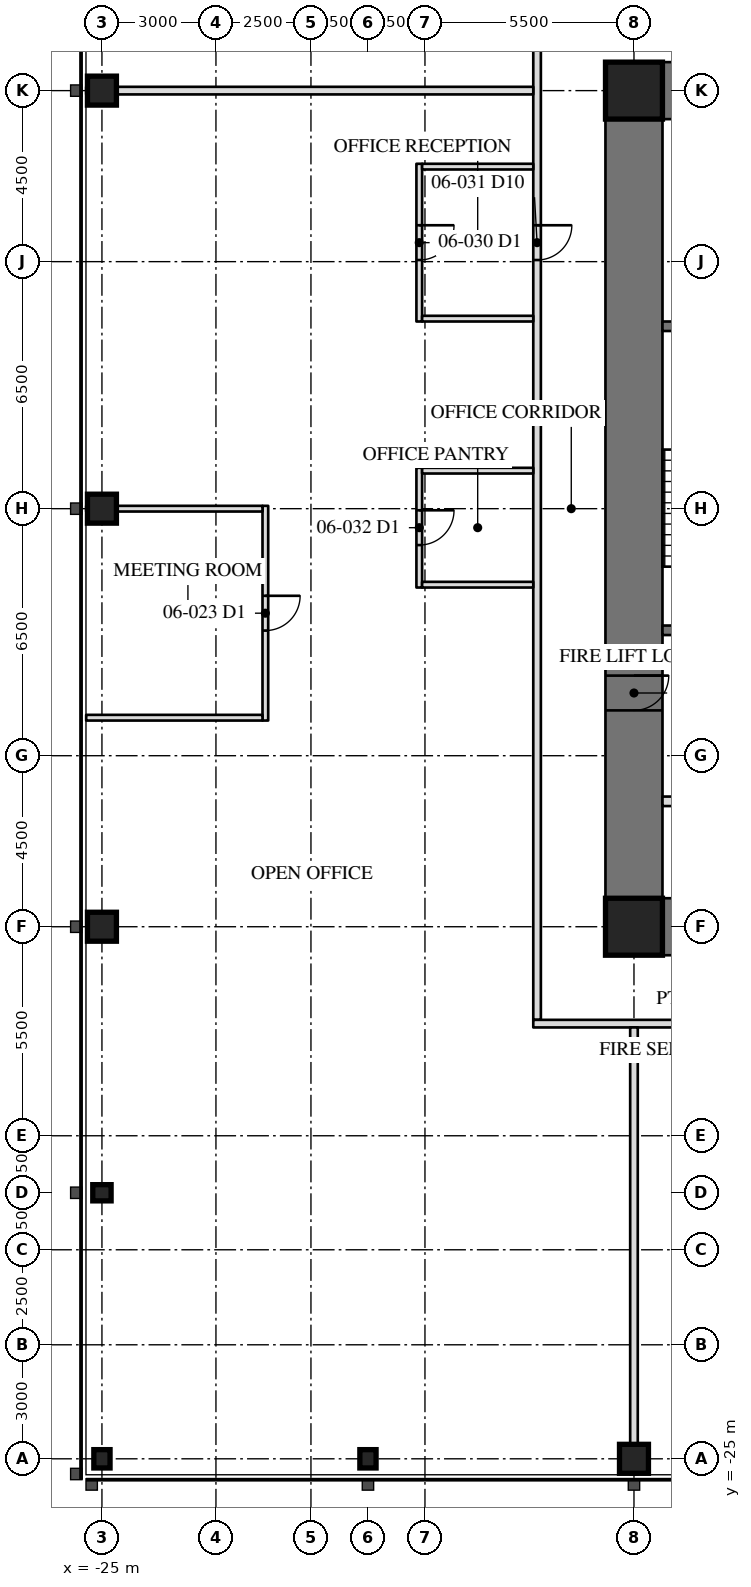
"""IFC4 building model, lengths in metres.
Left out: names, types, materials, properties, quantities, classifications, styles, units other than length and angle.
Written with IfcOpenShell. Run it as: python <this file> out.ifc"""

import sys

from ifc_helpers import new_model, si_unit, direction, frame, frame_2d, origin, origin_2d, place, context, subcontext, project, spatial, rectangle, hollow_rectangle, i_section, extrude, element, fill, save


model = new_model("IFC4")
c1 = context("Model", 3, precision=1e-05, world=origin(), true_north=direction((0.0, 1.0)))
c2 = subcontext(c1, "Body", "Model", "MODEL_VIEW")
j1 = project(units=[si_unit("LENGTHUNIT", "METRE"), si_unit("PLANEANGLEUNIT", "RADIAN")], contexts=[c1])
p1 = place(None, origin())
s1 = spatial("IfcSite", under=j1, at=p1, CompositionType="ELEMENT")
p2 = place(p1, origin())
s2 = spatial("IfcBuilding", under=s1, at=p2, CompositionType="ELEMENT")
p3 = place(p2, frame((0.0, 0.0, 28.3)))
s3 = spatial("IfcBuildingStorey", under=s2, at=p3, CompositionType="ELEMENT", Elevation=28.3)
for number, where, z_axis, x_axis in (
    (1, (-25.0, 0.0, 0.0), (0.0, 0.0, 1.0), (0.0, 1.0, 0.0)),
    (2, (-25.0, -11.0, 0.0), (0.0, 0.0, 1.0), (0.0, 1.0, 0.0)),
):
    element("IfcColumn", number, at=place(p3, frame(where, z_axis=z_axis, x_axis=x_axis)), inside=s3, PredefinedType="COLUMN", context=c2, shape_type="SweptSolid", body=[
        extrude(hollow_rectangle(XDim=0.762, YDim=0.762, WallThickness=0.127, at=origin_2d()), origin(), (0.0, 0.0, 1.0), 4.1),
    ])
for number, where, z_axis, x_axis in (
    (3, (-25.0, -18.0, 0.0), (0.0, 0.0, 1.0), (0.0, 1.0, 0.0)),
    (4, (-25.0, -25.0, 0.0), (0.0, 0.0, 1.0), (1.0, 0.0, 0.0)),
    (5, (-18.0, -25.0, 0.0), (0.0, 0.0, 1.0), (1.0, 0.0, 0.0)),
):
    element("IfcColumn", number, at=place(p3, frame(where, z_axis=z_axis, x_axis=x_axis)), inside=s3, PredefinedType="COLUMN", context=c2, shape_type="SweptSolid", body=[
        extrude(i_section(OverallWidth=0.427, OverallDepth=0.483, WebThickness=0.051, FlangeThickness=0.082, at=origin_2d()), origin(), (0.0, 0.0, 1.0), 4.1),
    ])
for number, where, z_axis, x_axis in (
    (6, (-11.0, -25.0, 0.0), (0.0, 0.0, 1.0), (1.0, 0.0, 0.0)),
    (7, (-25.0, 11.0, 0.0), (0.0, 0.0, 1.0), (0.0, 1.0, 0.0)),
):
    element("IfcColumn", number, at=place(p3, frame(where, z_axis=z_axis, x_axis=x_axis)), inside=s3, PredefinedType="COLUMN", context=c2, shape_type="SweptSolid", body=[
        extrude(hollow_rectangle(XDim=0.762, YDim=0.762, WallThickness=0.127, at=origin_2d()), origin(), (0.0, 0.0, 1.0), 4.1),
    ])
p4 = place(p3, frame((-11.0, 11.0, 0.0), z_axis=(0.0, 0.0, 1.0), x_axis=(0.0, -1.0, 0.0)))
e8 = element("IfcWall", 8, at=p4, inside=s3, PredefinedType="SHEAR", context=c2, shape_type="SweptSolid", body=[
    extrude(rectangle(XDim=22.0, YDim=1.5, at=frame_2d((11.0, 0.0))), origin(), (0.0, 0.0, 1.0), 4.1),
])
p5 = place(p4, frame((15.393, 0.0, 0.0)))
e9 = element("IfcOpeningElement", 9, at=p5, cuts=e8, PredefinedType="OPENING", context=c2, shape_type="SweptSolid", body=[
    extrude(rectangle(XDim=0.915, YDim=2.134, at=frame_2d((0.458, 1.067))), frame((0.0, 0.76, 0.0), z_axis=(0.0, -1.0, 0.0), x_axis=(1.0, 0.0, 0.0)), (0.0, 0.0, 1.0), 1.52),
])
for number, where, z_axis, x_axis in (
    (10, (-6.5, 11.0, 0.0), (0.0, 0.0, 1.0), (-1.0, 0.0, 0.0)),
    (11, (-11.0, -11.0, 0.0), (0.0, 0.0, 1.0), (1.0, 0.0, 0.0)),
):
    element("IfcWall", number, at=place(p3, frame(where, z_axis=z_axis, x_axis=x_axis)), inside=s3, PredefinedType="SHEAR", context=c2, shape_type="SweptSolid", body=[
        extrude(rectangle(XDim=4.5, YDim=1.5, at=frame_2d((2.25, 0.0))), origin(), (0.0, 0.0, 1.0), 4.1),
    ])
for number, where, z_axis, x_axis in (
    (12, (-11.0, 11.0, 0.0), (0.0, 0.0, 1.0), (1.0, 0.0, 0.0)),
    (13, (-11.0, -11.0, 0.0), (0.0, 0.0, 1.0), (1.0, 0.0, 0.0)),
):
    element("IfcColumn", number, at=place(p3, frame(where, z_axis=z_axis, x_axis=x_axis)), inside=s3, PredefinedType="COLUMN", context=c2, shape_type="SweptSolid", body=[
        extrude(hollow_rectangle(XDim=1.499, YDim=1.499, WallThickness=0.102, at=origin_2d()), origin(), (0.0, 0.0, 1.0), 4.1),
    ])
p6 = place(p3, frame((-6.95, 4.8, 0.0), z_axis=(0.0, 0.0, 1.0), x_axis=(-1.0, 0.0, 0.0)))
e14 = element("IfcWall", 14, at=p6, inside=s3, PredefinedType="SOLIDWALL", context=c2, shape_type="SweptSolid", body=[
    extrude(rectangle(XDim=3.3, YDim=0.25, at=frame_2d((1.65, 0.0))), origin(), (0.0, 0.0, 1.0), 3.91),
])
p7 = place(p3, frame((-6.95, -3.2, 0.0), z_axis=(0.0, 0.0, 1.0), x_axis=(-1.0, 0.0, 0.0)))
e15 = element("IfcWall", 15, at=p7, inside=s3, PredefinedType="SOLIDWALL", context=c2, shape_type="SweptSolid", body=[
    extrude(rectangle(XDim=3.3, YDim=0.25, at=frame_2d((1.65, 0.0))), origin(), (0.0, 0.0, 1.0), 3.91),
])
p8 = place(p7, frame((1.116, 0.0, 0.0)))
e16 = element("IfcOpeningElement", 16, at=p8, cuts=e15, PredefinedType="OPENING", context=c2, shape_type="SweptSolid", body=[
    extrude(rectangle(XDim=1.067, YDim=2.134, at=frame_2d((0.533, 1.067))), frame((0.0, 0.135, 0.0), z_axis=(0.0, -1.0, 0.0), x_axis=(1.0, 0.0, 0.0)), (0.0, 0.0, 1.0), 0.27),
])
p9 = place(p3, frame((-6.95, -7.7, 0.0), z_axis=(0.0, 0.0, 1.0), x_axis=(-1.0, 0.0, 0.0)))
e17 = element("IfcWall", 17, at=p9, inside=s3, PredefinedType="PARTITIONING", context=c2, shape_type="SweptSolid", body=[
    extrude(rectangle(XDim=3.3, YDim=0.25, at=frame_2d((1.65, 0.0))), origin(), (0.0, 0.0, 1.0), 3.91),
])
p10 = place(p9, frame((0.45, 0.0, 0.0)))
e18 = element("IfcOpeningElement", 18, at=p10, cuts=e17, PredefinedType="OPENING", context=c2, shape_type="SweptSolid", body=[
    extrude(rectangle(XDim=1.219, YDim=2.134, at=frame_2d((0.609, 1.067))), frame((0.0, 0.135, 0.0), z_axis=(0.0, -1.0, 0.0), x_axis=(1.0, 0.0, 0.0)), (0.0, 0.0, 1.0), 0.27),
])
p11 = place(p3, frame((-13.55, 13.65, 0.0), z_axis=(0.0, 0.0, 1.0), x_axis=(0.0, -1.0, 0.0)))
e19 = element("IfcWall", 19, at=p11, inside=s3, PredefinedType="PARTITIONING", context=c2, shape_type="SweptSolid", body=[
    extrude(rectangle(XDim=27.1, YDim=0.2, at=frame_2d((13.55, 0.0))), origin(), (0.0, 0.0, 1.0), 3.91),
])
p12 = place(p11, frame((6.192, 0.0, 0.0)))
e20 = element("IfcOpeningElement", 20, at=p12, cuts=e19, PredefinedType="OPENING", context=c2, shape_type="SweptSolid", body=[
    extrude(rectangle(XDim=0.915, YDim=2.134, at=frame_2d((0.458, 1.067))), frame((0.0, 0.11, 0.0), z_axis=(0.0, -1.0, 0.0), x_axis=(1.0, 0.0, 0.0)), (0.0, 0.0, 1.0), 0.22),
])
p13 = place(p3, frame((-13.65, -13.55, 0.0), z_axis=(0.0, 0.0, 1.0), x_axis=(1.0, 0.0, 0.0)))
e21 = element("IfcWall", 21, at=p13, inside=s3, PredefinedType="PARTITIONING", context=c2, shape_type="SweptSolid", body=[
    extrude(rectangle(XDim=27.1, YDim=0.2, at=frame_2d((13.55, 0.0))), origin(), (0.0, 0.0, 1.0), 3.91),
])
p14 = place(p13, frame((11.192, 0.0, 0.0)))
e22 = element("IfcOpeningElement", 22, at=p14, cuts=e21, PredefinedType="OPENING", context=c2, shape_type="SweptSolid", body=[
    extrude(rectangle(XDim=0.915, YDim=2.134, at=frame_2d((0.458, 1.067))), frame((0.0, 0.11, 0.0), z_axis=(0.0, -1.0, 0.0), x_axis=(1.0, 0.0, 0.0)), (0.0, 0.0, 1.0), 0.22),
])
for number, where, z_axis, x_axis in (
    (23, (-13.65, 11.0, 0.0), (0.0, 0.0, 1.0), (-1.0, 0.0, 0.0)),
    (24, (-11.0, -13.65, 0.0), (0.0, 0.0, 1.0), (0.0, -1.0, 0.0)),
):
    element("IfcWall", number, at=place(p3, frame(where, z_axis=z_axis, x_axis=x_axis)), inside=s3, PredefinedType="PARTITIONING", context=c2, shape_type="SweptSolid", body=[
        extrude(rectangle(XDim=11.765, YDim=0.2, at=frame_2d((5.883, 0.0))), origin(), (0.0, 0.0, 1.0), 3.13),
    ])
p15 = place(p3, frame((-20.7, 0.075, 0.0), z_axis=(0.0, 0.0, 1.0), x_axis=(0.0, -1.0, 0.0)))
e25 = element("IfcWall", 25, at=p15, inside=s3, PredefinedType="PARTITIONING", context=c2, shape_type="SweptSolid", body=[
    extrude(rectangle(XDim=5.65, YDim=0.15, at=frame_2d((2.825, 0.0))), origin(), (0.0, 0.0, 1.0), 3.91),
])
p16 = place(p15, frame((2.367, 0.0, 0.0)))
e26 = element("IfcOpeningElement", 26, at=p16, cuts=e25, PredefinedType="OPENING", context=c2, shape_type="SweptSolid", body=[
    extrude(rectangle(XDim=0.915, YDim=2.134, at=frame_2d((0.458, 1.067))), frame((0.0, 0.085, 0.0), z_axis=(0.0, -1.0, 0.0), x_axis=(1.0, 0.0, 0.0)), (0.0, 0.0, 1.0), 0.17),
])
p17 = place(p3, frame((-20.775, 0.0, 0.0), z_axis=(0.0, 0.0, 1.0), x_axis=(-1.0, 0.0, 0.0)))
e27 = element("IfcWall", 27, at=p17, inside=s3, PredefinedType="PARTITIONING", context=c2, shape_type="SweptSolid", body=[
    extrude(rectangle(XDim=4.64, YDim=0.15, at=frame_2d((2.32, 0.0))), origin(), (0.0, 0.0, 1.0), 3.13),
])
p18 = place(p3, frame((-20.775, -5.5, 0.0), z_axis=(0.0, 0.0, 1.0), x_axis=(-1.0, 0.0, 0.0)))
e28 = element("IfcWall", 28, at=p18, inside=s3, PredefinedType="PARTITIONING", context=c2, shape_type="SweptSolid", body=[
    extrude(rectangle(XDim=4.64, YDim=0.15, at=frame_2d((2.32, 0.0))), origin(), (0.0, 0.0, 1.0), 3.91),
])
p19 = place(p3, frame((-16.65, 9.075, 0.0), z_axis=(0.0, 0.0, 1.0), x_axis=(0.0, -1.0, 0.0)))
e29 = element("IfcWall", 29, at=p19, inside=s3, PredefinedType="PARTITIONING", context=c2, shape_type="SweptSolid", body=[
    extrude(rectangle(XDim=4.15, YDim=0.15, at=frame_2d((2.075, 0.0))), origin(), (0.0, 0.0, 1.0), 3.91),
])
p20 = place(p19, frame((1.617, 0.0, 0.0)))
e30 = element("IfcOpeningElement", 30, at=p20, cuts=e29, PredefinedType="OPENING", context=c2, shape_type="SweptSolid", body=[
    extrude(rectangle(XDim=0.915, YDim=2.134, at=frame_2d((0.458, 1.067))), frame((0.0, 0.085, 0.0), z_axis=(0.0, -1.0, 0.0), x_axis=(1.0, 0.0, 0.0)), (0.0, 0.0, 1.0), 0.17),
])
for number, where, z_axis, x_axis in (
    (31, (-16.575, 9.0, 0.0), (0.0, 0.0, 1.0), (1.0, 0.0, 0.0)),
    (32, (-16.575, 5.0, 0.0), (0.0, 0.0, 1.0), (1.0, 0.0, 0.0)),
):
    element("IfcWall", number, at=place(p3, frame(where, z_axis=z_axis, x_axis=x_axis)), inside=s3, PredefinedType="PARTITIONING", context=c2, shape_type="SweptSolid", body=[
        extrude(rectangle(XDim=2.925, YDim=0.15, at=frame_2d((1.462, 0.0))), origin(), (0.0, 0.0, 1.0), 3.91),
    ])
p21 = place(p3, frame((-16.65, 1.075, 0.0), z_axis=(0.0, 0.0, 1.0), x_axis=(0.0, -1.0, 0.0)))
e33 = element("IfcWall", 33, at=p21, inside=s3, PredefinedType="PARTITIONING", context=c2, shape_type="SweptSolid", body=[
    extrude(rectangle(XDim=3.15, YDim=0.15, at=frame_2d((1.575, 0.0))), origin(), (0.0, 0.0, 1.0), 3.91),
])
p22 = place(p21, frame((1.117, 0.0, 0.0)))
e34 = element("IfcOpeningElement", 34, at=p22, cuts=e33, PredefinedType="OPENING", context=c2, shape_type="SweptSolid", body=[
    extrude(rectangle(XDim=0.915, YDim=2.134, at=frame_2d((0.458, 1.067))), frame((0.0, 0.085, 0.0), z_axis=(0.0, -1.0, 0.0), x_axis=(1.0, 0.0, 0.0)), (0.0, 0.0, 1.0), 0.17),
])
for number, where, z_axis, x_axis in (
    (35, (-16.575, 1.0, 0.0), (0.0, 0.0, 1.0), (1.0, 0.0, 0.0)),
    (36, (-16.575, -2.0, 0.0), (0.0, 0.0, 1.0), (1.0, 0.0, 0.0)),
):
    element("IfcWall", number, at=place(p3, frame(where, z_axis=z_axis, x_axis=x_axis)), inside=s3, PredefinedType="PARTITIONING", context=c2, shape_type="SweptSolid", body=[
        extrude(rectangle(XDim=2.925, YDim=0.15, at=frame_2d((1.462, 0.0))), origin(), (0.0, 0.0, 1.0), 3.91),
    ])
p23 = place(p5, origin())
e37 = element("IfcDoor", 37, at=p23, inside=s3, OperationType="SINGLE_SWING_RIGHT", PredefinedType="DOOR", context=c2, shape_type="SweptSolid", body=[
    extrude(rectangle(XDim=0.915, YDim=2.134, at=frame_2d((0.458, 1.067))), frame((0.0, -0.675, 0.0), z_axis=(0.0, -1.0, 0.0), x_axis=(1.0, 0.0, 0.0)), (0.0, 0.0, 1.0), 0.05),
])
fill(e9, e37)
p24 = place(p16, origin())
e38 = element("IfcDoor", 38, at=p24, inside=s3, OperationType="SINGLE_SWING_LEFT", PredefinedType="DOOR", context=c2, shape_type="SweptSolid", body=[
    extrude(rectangle(XDim=0.915, YDim=2.134, at=frame_2d((0.458, 1.067))), frame((0.0, 0.025, 0.0), z_axis=(0.0, -1.0, 0.0), x_axis=(1.0, 0.0, 0.0)), (0.0, 0.0, 1.0), 0.05),
])
fill(e26, e38)
p25 = place(p20, origin())
e39 = element("IfcDoor", 39, at=p25, inside=s3, OperationType="SINGLE_SWING_LEFT", PredefinedType="DOOR", context=c2, shape_type="SweptSolid", body=[
    extrude(rectangle(XDim=0.915, YDim=2.134, at=frame_2d((0.458, 1.067))), frame((0.0, 0.025, 0.0), z_axis=(0.0, -1.0, 0.0), x_axis=(1.0, 0.0, 0.0)), (0.0, 0.0, 1.0), 0.05),
])
fill(e30, e39)
p26 = place(p12, origin())
e40 = element("IfcDoor", 40, at=p26, inside=s3, OperationType="SINGLE_SWING_LEFT", PredefinedType="DOOR", context=c2, shape_type="SweptSolid", body=[
    extrude(rectangle(XDim=0.915, YDim=2.134, at=frame_2d((0.458, 1.067))), frame((0.0, 0.025, 0.0), z_axis=(0.0, -1.0, 0.0), x_axis=(1.0, 0.0, 0.0)), (0.0, 0.0, 1.0), 0.05),
])
fill(e20, e40)
p27 = place(p22, origin())
e41 = element("IfcDoor", 41, at=p27, inside=s3, OperationType="SINGLE_SWING_LEFT", PredefinedType="DOOR", context=c2, shape_type="SweptSolid", body=[
    extrude(rectangle(XDim=0.915, YDim=2.134, at=frame_2d((0.458, 1.067))), frame((0.0, 0.025, 0.0), z_axis=(0.0, -1.0, 0.0), x_axis=(1.0, 0.0, 0.0)), (0.0, 0.0, 1.0), 0.05),
])
fill(e34, e41)
save(model, sys.argv[1])
